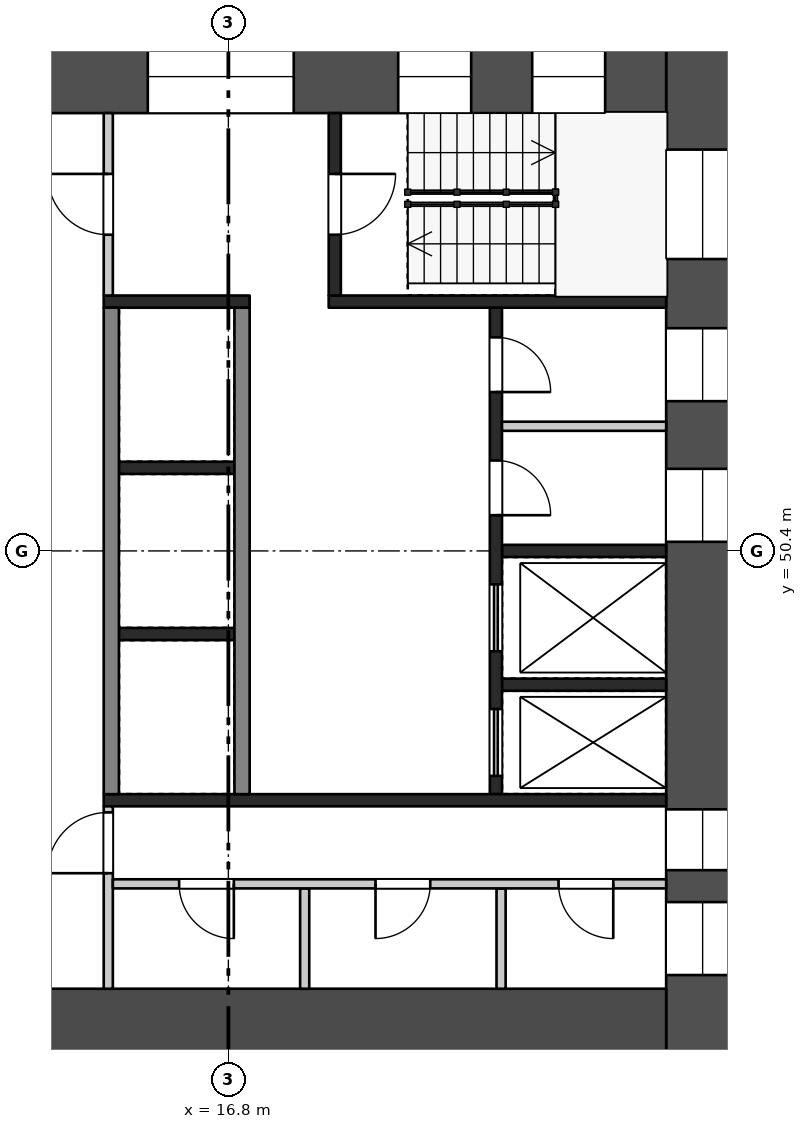
"""IFC4 building model, lengths in metres.
Left out: names, types, materials, properties, quantities, classifications, styles, units other than length and angle.
Written with IfcOpenShell. Run it as: python <this file> out.ifc"""

import sys

from ifc_helpers import new_model, si_unit, direction, frame, frame_2d, origin, place, context, subcontext, project, spatial, rectangle, extrude, element, fill, save


model = new_model("IFC4")
c1 = context("Model", 3, precision=1e-05, world=origin(), true_north=direction((0.0, 1.0)))
c2 = subcontext(c1, "Body", "Model", "MODEL_VIEW")
j1 = project(units=[si_unit("LENGTHUNIT", "METRE"), si_unit("PLANEANGLEUNIT", "RADIAN")], contexts=[c1])
p1 = place(None, origin())
s1 = spatial("IfcSite", under=j1, at=p1, CompositionType="ELEMENT")
p2 = place(p1, origin())
s2 = spatial("IfcBuilding", under=s1, at=p2, CompositionType="ELEMENT")
p3 = place(p2, frame((0.0, 0.0, 119.7)))
s3 = spatial("IfcBuildingStorey", under=s2, at=p3, CompositionType="ELEMENT", Elevation=119.7)
p4 = place(p3, frame((24.6, 58.8, 0.0), z_axis=(0.0, 0.0, 1.0), x_axis=(0.0, -1.0, 0.0)))
e1 = element("IfcWall", 1, at=p4, inside=s3, PredefinedType="SHEAR", context=c2, shape_type="SweptSolid", body=[
    extrude(rectangle(XDim=16.8, YDim=1.2, at=frame_2d((8.4, 0.0))), origin(), (0.0, 0.0, 1.0), 3.22),
])
p5 = place(p4, frame((1.8, 0.0, 0.5)))
e2 = element("IfcOpeningElement", 2, at=p5, cuts=e1, PredefinedType="OPENING", context=c2, shape_type="SweptSolid", body=[
    extrude(rectangle(XDim=1.8, YDim=2.4, at=frame_2d((0.9, 1.2))), frame((0.0, 0.61, 0.0), z_axis=(0.0, -1.0, 0.0), x_axis=(1.0, 0.0, 0.0)), (0.0, 0.0, 1.0), 1.22),
])
p6 = place(p4, frame((4.738, 0.0, 1.6)))
e3 = element("IfcOpeningElement", 3, at=p6, cuts=e1, PredefinedType="OPENING", context=c2, shape_type="SweptSolid", body=[
    extrude(rectangle(XDim=1.2, YDim=1.2, at=frame_2d((0.6, 0.6))), frame((0.0, 0.61, 0.0), z_axis=(0.0, -1.0, 0.0), x_axis=(1.0, 0.0, 0.0)), (0.0, 0.0, 1.0), 1.22),
])
p7 = place(p4, frame((7.05, 0.0, 1.6)))
e4 = element("IfcOpeningElement", 4, at=p7, cuts=e1, PredefinedType="OPENING", context=c2, shape_type="SweptSolid", body=[
    extrude(rectangle(XDim=1.2, YDim=1.2, at=frame_2d((0.6, 0.6))), frame((0.0, 0.61, 0.0), z_axis=(0.0, -1.0, 0.0), x_axis=(1.0, 0.0, 0.0)), (0.0, 0.0, 1.0), 1.22),
])
p8 = place(p4, frame((12.65, 0.0, 0.6)))
e5 = element("IfcOpeningElement", 5, at=p8, cuts=e1, PredefinedType="OPENING", context=c2, shape_type="SweptSolid", body=[
    extrude(rectangle(XDim=1.0, YDim=2.1, at=frame_2d((0.5, 1.05))), frame((0.0, 0.61, 0.0), z_axis=(0.0, -1.0, 0.0), x_axis=(1.0, 0.0, 0.0)), (0.0, 0.0, 1.0), 1.22),
])
p9 = place(p4, frame((14.175, 0.0, 1.6)))
e6 = element("IfcOpeningElement", 6, at=p9, cuts=e1, PredefinedType="OPENING", context=c2, shape_type="SweptSolid", body=[
    extrude(rectangle(XDim=1.2, YDim=1.2, at=frame_2d((0.6, 0.6))), frame((0.0, 0.61, 0.0), z_axis=(0.0, -1.0, 0.0), x_axis=(1.0, 0.0, 0.0)), (0.0, 0.0, 1.0), 1.22),
])
p10 = place(p3, frame((9.6, 58.2, 0.0), z_axis=(0.0, 0.0, 1.0), x_axis=(1.0, 0.0, 0.0)))
e7 = element("IfcWall", 7, at=p10, inside=s3, PredefinedType="SHEAR", context=c2, shape_type="SweptSolid", body=[
    extrude(rectangle(XDim=14.4, YDim=1.2, at=frame_2d((7.2, 0.0))), origin(), (0.0, 0.0, 1.0), 3.22),
])
p11 = place(p10, frame((1.105, 0.0, 0.6)))
e8 = element("IfcOpeningElement", 8, at=p11, cuts=e7, PredefinedType="OPENING", context=c2, shape_type="SweptSolid", body=[
    extrude(rectangle(XDim=3.0, YDim=2.1, at=frame_2d((1.5, 1.05))), frame((0.0, 0.61, 0.0), z_axis=(0.0, -1.0, 0.0), x_axis=(1.0, 0.0, 0.0)), (0.0, 0.0, 1.0), 1.22),
])
p12 = place(p10, frame((5.875, 0.0, 0.6)))
e9 = element("IfcOpeningElement", 9, at=p12, cuts=e7, PredefinedType="OPENING", context=c2, shape_type="SweptSolid", body=[
    extrude(rectangle(XDim=2.4, YDim=2.1, at=frame_2d((1.2, 1.05))), frame((0.0, 0.61, 0.0), z_axis=(0.0, -1.0, 0.0), x_axis=(1.0, 0.0, 0.0)), (0.0, 0.0, 1.0), 1.22),
])
p13 = place(p10, frame((9.993, 0.0, 0.5)))
e10 = element("IfcOpeningElement", 10, at=p13, cuts=e7, PredefinedType="OPENING", context=c2, shape_type="SweptSolid", body=[
    extrude(rectangle(XDim=1.2, YDim=2.4, at=frame_2d((0.6, 1.2))), frame((0.0, 0.61, 0.0), z_axis=(0.0, -1.0, 0.0), x_axis=(1.0, 0.0, 0.0)), (0.0, 0.0, 1.0), 1.22),
])
p14 = place(p10, frame((12.197, 0.0, 0.5)))
e11 = element("IfcOpeningElement", 11, at=p14, cuts=e7, PredefinedType="OPENING", context=c2, shape_type="SweptSolid", body=[
    extrude(rectangle(XDim=1.2, YDim=2.4, at=frame_2d((0.6, 1.2))), frame((0.0, 0.61, 0.0), z_axis=(0.0, -1.0, 0.0), x_axis=(1.0, 0.0, 0.0)), (0.0, 0.0, 1.0), 1.22),
])
p15 = place(p3, frame((9.6, 42.6, 0.0), z_axis=(0.0, 0.0, 1.0), x_axis=(1.0, 0.0, 0.0)))
e12 = element("IfcWall", 12, at=p15, inside=s3, PredefinedType="SHEAR", context=c2, shape_type="SweptSolid", body=[
    extrude(rectangle(XDim=14.4, YDim=1.2, at=frame_2d((7.2, 0.0))), origin(), (0.0, 0.0, 1.0), 3.22),
])
p16 = place(p15, frame((2.1, 0.0, 0.0)))
e13 = element("IfcOpeningElement", 13, at=p16, cuts=e12, PredefinedType="OPENING", context=c2, shape_type="SweptSolid", body=[
    extrude(rectangle(XDim=1.8, YDim=2.1, at=frame_2d((0.9, 1.05))), frame((0.0, 0.61, 0.0), z_axis=(0.0, -1.0, 0.0), x_axis=(1.0, 0.0, 0.0)), (0.0, 0.0, 1.0), 1.22),
])
for number, where, z_axis, x_axis in (
    (14, (15.0, 51.767, 0.0), (0.0, 0.0, 1.0), (1.0, 0.0, 0.0)),
    (15, (15.0, 49.033, 0.0), (0.0, 0.0, 1.0), (1.0, 0.0, 0.0)),
):
    element("IfcWall", number, at=place(p3, frame(where, z_axis=z_axis, x_axis=x_axis)), inside=s3, PredefinedType="SHEAR", context=c2, shape_type="SweptSolid", body=[
        extrude(rectangle(XDim=1.9, YDim=0.2, at=frame_2d((0.95, 0.0))), origin(), (0.0, 0.0, 1.0), 3.22),
    ])
for number, where, z_axis, x_axis in (
    (16, (14.875, 54.4, 0.0), (0.0, 0.0, 1.0), (0.0, -1.0, 0.0)),
    (17, (17.025, 54.4, 0.0), (0.0, 0.0, 1.0), (0.0, -1.0, 0.0)),
):
    element("IfcWall", number, at=place(p3, frame(where, z_axis=z_axis, x_axis=x_axis)), inside=s3, PredefinedType="SHEAR", context=c2, shape_type="SweptSolid", body=[
        extrude(rectangle(XDim=8.0, YDim=0.25, at=frame_2d((4.0, 0.0))), origin(), (0.0, 0.0, 1.0), 3.22),
    ])
for number, where, z_axis, x_axis in (
    (18, (21.3, 50.4, 0.0), (0.0, 0.0, 1.0), (1.0, 0.0, 0.0)),
    (19, (21.3, 48.2, 0.0), (0.0, 0.0, 1.0), (1.0, 0.0, 0.0)),
):
    element("IfcWall", number, at=place(p3, frame(where, z_axis=z_axis, x_axis=x_axis)), inside=s3, PredefinedType="SHEAR", context=c2, shape_type="SweptSolid", body=[
        extrude(rectangle(XDim=2.7, YDim=0.2, at=frame_2d((1.35, 0.0))), origin(), (0.0, 0.0, 1.0), 3.22),
    ])
p17 = place(p3, frame((21.3, 52.45, 0.0), z_axis=(0.0, 0.0, 1.0), x_axis=(1.0, 0.0, 0.0)))
e20 = element("IfcWall", 20, at=p17, inside=s3, PredefinedType="PARTITIONING", context=c2, shape_type="SweptSolid", body=[
    extrude(rectangle(XDim=2.7, YDim=0.15, at=frame_2d((1.35, 0.0))), origin(), (0.0, 0.0, 1.0), 3.22),
])
p18 = place(p3, frame((21.2, 54.4, 0.0), z_axis=(0.0, 0.0, 1.0), x_axis=(0.0, -1.0, 0.0)))
e21 = element("IfcWall", 21, at=p18, inside=s3, PredefinedType="SHEAR", context=c2, shape_type="SweptSolid", body=[
    extrude(rectangle(XDim=8.0, YDim=0.2, at=frame_2d((4.0, 0.0))), origin(), (0.0, 0.0, 1.0), 3.22),
])
p19 = place(p18, frame((0.488, 0.0, 0.0)))
e22 = element("IfcOpeningElement", 22, at=p19, cuts=e21, PredefinedType="OPENING", context=c2, shape_type="SweptSolid", body=[
    extrude(rectangle(XDim=0.9, YDim=2.1, at=frame_2d((0.45, 1.05))), frame((0.0, 0.11, 0.0), z_axis=(0.0, -1.0, 0.0), x_axis=(1.0, 0.0, 0.0)), (0.0, 0.0, 1.0), 0.22),
])
p20 = place(p18, frame((2.512, 0.0, 0.0)))
e23 = element("IfcOpeningElement", 23, at=p20, cuts=e21, PredefinedType="OPENING", context=c2, shape_type="SweptSolid", body=[
    extrude(rectangle(XDim=0.9, YDim=2.1, at=frame_2d((0.45, 1.05))), frame((0.0, 0.11, 0.0), z_axis=(0.0, -1.0, 0.0), x_axis=(1.0, 0.0, 0.0)), (0.0, 0.0, 1.0), 0.22),
])
p21 = place(p18, frame((4.55, 0.0, 0.0)))
e24 = element("IfcOpeningElement", 24, at=p21, cuts=e21, PredefinedType="OPENING", context=c2, shape_type="SweptSolid", body=[
    extrude(rectangle(XDim=1.1, YDim=2.1, at=frame_2d((0.55, 1.05))), frame((0.0, 0.11, 0.0), z_axis=(0.0, -1.0, 0.0), x_axis=(1.0, 0.0, 0.0)), (0.0, 0.0, 1.0), 0.22),
])
p22 = place(p18, frame((6.6, 0.0, 0.0)))
e25 = element("IfcOpeningElement", 25, at=p22, cuts=e21, PredefinedType="OPENING", context=c2, shape_type="SweptSolid", body=[
    extrude(rectangle(XDim=1.1, YDim=2.1, at=frame_2d((0.55, 1.05))), frame((0.0, 0.11, 0.0), z_axis=(0.0, -1.0, 0.0), x_axis=(1.0, 0.0, 0.0)), (0.0, 0.0, 1.0), 0.22),
])
p23 = place(p3, frame((14.75, 54.5, 0.0), z_axis=(0.0, 0.0, 1.0), x_axis=(1.0, 0.0, 0.0)))
e26 = element("IfcWall", 26, at=p23, inside=s3, PredefinedType="SHEAR", context=c2, shape_type="SweptSolid", body=[
    extrude(rectangle(XDim=2.4, YDim=0.2, at=frame_2d((1.2, 0.0))), origin(), (0.0, 0.0, 1.0), 3.22),
])
p24 = place(p3, frame((18.45, 54.5, 0.0), z_axis=(0.0, 0.0, 1.0), x_axis=(1.0, 0.0, 0.0)))
e27 = element("IfcWall", 27, at=p24, inside=s3, PredefinedType="SHEAR", context=c2, shape_type="SweptSolid", body=[
    extrude(rectangle(XDim=5.55, YDim=0.2, at=frame_2d((2.775, 0.0))), origin(), (0.0, 0.0, 1.0), 3.22),
])
p25 = place(p3, frame((14.825, 57.6, 0.0), z_axis=(0.0, 0.0, 1.0), x_axis=(0.0, -1.0, 0.0)))
e28 = element("IfcWall", 28, at=p25, inside=s3, PredefinedType="PARTITIONING", context=c2, shape_type="SweptSolid", body=[
    extrude(rectangle(XDim=3.0, YDim=0.15, at=frame_2d((1.5, 0.0))), origin(), (0.0, 0.0, 1.0), 3.22),
])
p26 = place(p25, frame((1.0, 0.0, 0.0)))
e29 = element("IfcOpeningElement", 29, at=p26, cuts=e28, PredefinedType="OPENING", context=c2, shape_type="SweptSolid", body=[
    extrude(rectangle(XDim=1.0, YDim=2.1, at=frame_2d((0.5, 1.05))), frame((0.0, 0.085, 0.0), z_axis=(0.0, -1.0, 0.0), x_axis=(1.0, 0.0, 0.0)), (0.0, 0.0, 1.0), 0.17),
])
p27 = place(p3, frame((18.55, 57.6, 0.0), z_axis=(0.0, 0.0, 1.0), x_axis=(0.0, -1.0, 0.0)))
e30 = element("IfcWall", 30, at=p27, inside=s3, PredefinedType="SHEAR", context=c2, shape_type="SweptSolid", body=[
    extrude(rectangle(XDim=3.0, YDim=0.2, at=frame_2d((1.5, 0.0))), origin(), (0.0, 0.0, 1.0), 3.22),
])
p28 = place(p27, frame((1.0, 0.0, 0.0)))
e31 = element("IfcOpeningElement", 31, at=p28, cuts=e30, PredefinedType="OPENING", context=c2, shape_type="SweptSolid", body=[
    extrude(rectangle(XDim=1.0, YDim=2.1, at=frame_2d((0.5, 1.05))), frame((0.0, 0.11, 0.0), z_axis=(0.0, -1.0, 0.0), x_axis=(1.0, 0.0, 0.0)), (0.0, 0.0, 1.0), 0.22),
])
p29 = place(p3, frame((14.75, 46.3, 0.0), z_axis=(0.0, 0.0, 1.0), x_axis=(1.0, 0.0, 0.0)))
e32 = element("IfcWall", 32, at=p29, inside=s3, PredefinedType="SHEAR", context=c2, shape_type="SweptSolid", body=[
    extrude(rectangle(XDim=9.25, YDim=0.2, at=frame_2d((4.625, 0.0))), origin(), (0.0, 0.0, 1.0), 3.22),
])
p30 = place(p3, frame((14.825, 46.2, 0.0), z_axis=(0.0, 0.0, 1.0), x_axis=(0.0, -1.0, 0.0)))
e33 = element("IfcWall", 33, at=p30, inside=s3, PredefinedType="PARTITIONING", context=c2, shape_type="SweptSolid", body=[
    extrude(rectangle(XDim=3.0, YDim=0.15, at=frame_2d((1.5, 0.0))), origin(), (0.0, 0.0, 1.0), 3.22),
])
p31 = place(p30, frame((0.1, 0.0, 0.0)))
e34 = element("IfcOpeningElement", 34, at=p31, cuts=e33, PredefinedType="OPENING", context=c2, shape_type="SweptSolid", body=[
    extrude(rectangle(XDim=1.0, YDim=2.1, at=frame_2d((0.5, 1.05))), frame((0.0, 0.085, 0.0), z_axis=(0.0, -1.0, 0.0), x_axis=(1.0, 0.0, 0.0)), (0.0, 0.0, 1.0), 0.17),
])
for number, where, z_axis, x_axis in (
    (35, (18.055, 44.85, 0.0), (0.0, 0.0, 1.0), (0.0, -1.0, 0.0)),
    (36, (21.285, 44.85, 0.0), (0.0, 0.0, 1.0), (0.0, -1.0, 0.0)),
):
    element("IfcWall", number, at=place(p3, frame(where, z_axis=z_axis, x_axis=x_axis)), inside=s3, PredefinedType="PARTITIONING", context=c2, shape_type="SweptSolid", body=[
        extrude(rectangle(XDim=1.65, YDim=0.15, at=frame_2d((0.825, 0.0))), origin(), (0.0, 0.0, 1.0), 3.22),
    ])
p32 = place(p3, frame((14.9, 44.925, 0.0), z_axis=(0.0, 0.0, 1.0), x_axis=(1.0, 0.0, 0.0)))
e37 = element("IfcWall", 37, at=p32, inside=s3, PredefinedType="PARTITIONING", context=c2, shape_type="SweptSolid", body=[
    extrude(rectangle(XDim=9.1, YDim=0.15, at=frame_2d((4.55, 0.0))), origin(), (0.0, 0.0, 1.0), 3.22),
])
p33 = place(p32, frame((1.09, 0.0, 0.0)))
e38 = element("IfcOpeningElement", 38, at=p33, cuts=e37, PredefinedType="OPENING", context=c2, shape_type="SweptSolid", body=[
    extrude(rectangle(XDim=0.9, YDim=2.1, at=frame_2d((0.45, 1.05))), frame((0.0, 0.085, 0.0), z_axis=(0.0, -1.0, 0.0), x_axis=(1.0, 0.0, 0.0)), (0.0, 0.0, 1.0), 0.17),
])
p34 = place(p32, frame((4.32, 0.0, 0.0)))
e39 = element("IfcOpeningElement", 39, at=p34, cuts=e37, PredefinedType="OPENING", context=c2, shape_type="SweptSolid", body=[
    extrude(rectangle(XDim=0.9, YDim=2.1, at=frame_2d((0.45, 1.05))), frame((0.0, 0.085, 0.0), z_axis=(0.0, -1.0, 0.0), x_axis=(1.0, 0.0, 0.0)), (0.0, 0.0, 1.0), 0.17),
])
p35 = place(p32, frame((7.33, 0.0, 0.0)))
e40 = element("IfcOpeningElement", 40, at=p35, cuts=e37, PredefinedType="OPENING", context=c2, shape_type="SweptSolid", body=[
    extrude(rectangle(XDim=0.9, YDim=2.1, at=frame_2d((0.45, 1.05))), frame((0.0, 0.085, 0.0), z_axis=(0.0, -1.0, 0.0), x_axis=(1.0, 0.0, 0.0)), (0.0, 0.0, 1.0), 0.17),
])
p36 = place(p19, origin())
e41 = element("IfcDoor", 41, at=p36, inside=s3, OperationType="SINGLE_SWING_RIGHT", PredefinedType="DOOR", context=c2, shape_type="SweptSolid", body=[
    extrude(rectangle(XDim=0.9, YDim=2.1, at=frame_2d((0.45, 1.05))), frame((0.0, 0.025, 0.0), z_axis=(0.0, -1.0, 0.0), x_axis=(1.0, 0.0, 0.0)), (0.0, 0.0, 1.0), 0.05),
])
fill(e22, e41)
p37 = place(p20, origin())
e42 = element("IfcDoor", 42, at=p37, inside=s3, OperationType="SINGLE_SWING_RIGHT", PredefinedType="DOOR", context=c2, shape_type="SweptSolid", body=[
    extrude(rectangle(XDim=0.9, YDim=2.1, at=frame_2d((0.45, 1.05))), frame((0.0, 0.025, 0.0), z_axis=(0.0, -1.0, 0.0), x_axis=(1.0, 0.0, 0.0)), (0.0, 0.0, 1.0), 0.05),
])
fill(e23, e42)
p38 = place(p21, origin())
e43 = element("IfcDoor", 43, at=p38, inside=s3, OperationType="DOUBLE_DOOR_SLIDING", PredefinedType="DOOR", context=c2, shape_type="SweptSolid", body=[
    extrude(rectangle(XDim=1.1, YDim=2.1, at=frame_2d((0.55, 1.05))), frame((0.0, 0.025, 0.0), z_axis=(0.0, -1.0, 0.0), x_axis=(1.0, 0.0, 0.0)), (0.0, 0.0, 1.0), 0.05),
])
fill(e24, e43)
p39 = place(p22, origin())
e44 = element("IfcDoor", 44, at=p39, inside=s3, OperationType="DOUBLE_DOOR_SLIDING", PredefinedType="DOOR", context=c2, shape_type="SweptSolid", body=[
    extrude(rectangle(XDim=1.1, YDim=2.1, at=frame_2d((0.55, 1.05))), frame((0.0, 0.025, 0.0), z_axis=(0.0, -1.0, 0.0), x_axis=(1.0, 0.0, 0.0)), (0.0, 0.0, 1.0), 0.05),
])
fill(e25, e44)
p40 = place(p26, frame((1.0, 0.0, 0.0), z_axis=(0.0, 0.0, 1.0), x_axis=(-1.0, 0.0, 0.0)))
e45 = element("IfcDoor", 45, at=p40, inside=s3, OperationType="SINGLE_SWING_RIGHT", PredefinedType="DOOR", context=c2, shape_type="SweptSolid", body=[
    extrude(rectangle(XDim=1.0, YDim=2.1, at=frame_2d((0.5, 1.05))), frame((0.0, 0.025, 0.0), z_axis=(0.0, -1.0, 0.0), x_axis=(1.0, 0.0, 0.0)), (0.0, 0.0, 1.0), 0.05),
])
fill(e29, e45)
p41 = place(p28, origin())
e46 = element("IfcDoor", 46, at=p41, inside=s3, OperationType="SINGLE_SWING_LEFT", PredefinedType="DOOR", context=c2, shape_type="SweptSolid", body=[
    extrude(rectangle(XDim=1.0, YDim=2.1, at=frame_2d((0.5, 1.05))), frame((0.0, 0.025, 0.0), z_axis=(0.0, -1.0, 0.0), x_axis=(1.0, 0.0, 0.0)), (0.0, 0.0, 1.0), 0.05),
])
fill(e31, e46)
p42 = place(p31, frame((1.0, 0.0, 0.0), z_axis=(0.0, 0.0, 1.0), x_axis=(-1.0, 0.0, 0.0)))
e47 = element("IfcDoor", 47, at=p42, inside=s3, OperationType="SINGLE_SWING_LEFT", PredefinedType="DOOR", context=c2, shape_type="SweptSolid", body=[
    extrude(rectangle(XDim=1.0, YDim=2.1, at=frame_2d((0.5, 1.05))), frame((0.0, 0.025, 0.0), z_axis=(0.0, -1.0, 0.0), x_axis=(1.0, 0.0, 0.0)), (0.0, 0.0, 1.0), 0.05),
])
fill(e34, e47)
p43 = place(p33, frame((0.9, 0.0, 0.0), z_axis=(0.0, 0.0, 1.0), x_axis=(-1.0, 0.0, 0.0)))
e48 = element("IfcDoor", 48, at=p43, inside=s3, OperationType="SINGLE_SWING_LEFT", PredefinedType="DOOR", context=c2, shape_type="SweptSolid", body=[
    extrude(rectangle(XDim=0.9, YDim=2.1, at=frame_2d((0.45, 1.05))), frame((0.0, 0.025, 0.0), z_axis=(0.0, -1.0, 0.0), x_axis=(1.0, 0.0, 0.0)), (0.0, 0.0, 1.0), 0.05),
])
fill(e38, e48)
p44 = place(p34, frame((0.9, 0.0, 0.0), z_axis=(0.0, 0.0, 1.0), x_axis=(-1.0, 0.0, 0.0)))
e49 = element("IfcDoor", 49, at=p44, inside=s3, OperationType="SINGLE_SWING_RIGHT", PredefinedType="DOOR", context=c2, shape_type="SweptSolid", body=[
    extrude(rectangle(XDim=0.9, YDim=2.1, at=frame_2d((0.45, 1.05))), frame((0.0, 0.025, 0.0), z_axis=(0.0, -1.0, 0.0), x_axis=(1.0, 0.0, 0.0)), (0.0, 0.0, 1.0), 0.05),
])
fill(e39, e49)
p45 = place(p35, frame((0.9, 0.0, 0.0), z_axis=(0.0, 0.0, 1.0), x_axis=(-1.0, 0.0, 0.0)))
e50 = element("IfcDoor", 50, at=p45, inside=s3, OperationType="SINGLE_SWING_LEFT", PredefinedType="DOOR", context=c2, shape_type="SweptSolid", body=[
    extrude(rectangle(XDim=0.9, YDim=2.1, at=frame_2d((0.45, 1.05))), frame((0.0, 0.025, 0.0), z_axis=(0.0, -1.0, 0.0), x_axis=(1.0, 0.0, 0.0)), (0.0, 0.0, 1.0), 0.05),
])
fill(e40, e50)
p46 = place(p5, origin())
e51 = element("IfcWindow", 51, at=p46, inside=s3, PartitioningType="SINGLE_PANEL", PredefinedType="WINDOW", context=c2, shape_type="SweptSolid", body=[
    extrude(rectangle(XDim=1.8, YDim=2.4, at=frame_2d((0.9, 1.2))), frame((0.0, 0.03, 0.0), z_axis=(0.0, -1.0, 0.0), x_axis=(1.0, 0.0, 0.0)), (0.0, 0.0, 1.0), 0.06),
])
fill(e2, e51)
p47 = place(p6, origin())
e52 = element("IfcWindow", 52, at=p47, inside=s3, PartitioningType="SINGLE_PANEL", PredefinedType="WINDOW", context=c2, shape_type="SweptSolid", body=[
    extrude(rectangle(XDim=1.2, YDim=1.2, at=frame_2d((0.6, 0.6))), frame((0.0, 0.03, 0.0), z_axis=(0.0, -1.0, 0.0), x_axis=(1.0, 0.0, 0.0)), (0.0, 0.0, 1.0), 0.06),
])
fill(e3, e52)
p48 = place(p7, origin())
e53 = element("IfcWindow", 53, at=p48, inside=s3, PartitioningType="SINGLE_PANEL", PredefinedType="WINDOW", context=c2, shape_type="SweptSolid", body=[
    extrude(rectangle(XDim=1.2, YDim=1.2, at=frame_2d((0.6, 0.6))), frame((0.0, 0.03, 0.0), z_axis=(0.0, -1.0, 0.0), x_axis=(1.0, 0.0, 0.0)), (0.0, 0.0, 1.0), 0.06),
])
fill(e4, e53)
p49 = place(p8, origin())
e54 = element("IfcWindow", 54, at=p49, inside=s3, PartitioningType="SINGLE_PANEL", PredefinedType="WINDOW", context=c2, shape_type="SweptSolid", body=[
    extrude(rectangle(XDim=1.0, YDim=2.1, at=frame_2d((0.5, 1.05))), frame((0.0, 0.03, 0.0), z_axis=(0.0, -1.0, 0.0), x_axis=(1.0, 0.0, 0.0)), (0.0, 0.0, 1.0), 0.06),
])
fill(e5, e54)
p50 = place(p9, origin())
e55 = element("IfcWindow", 55, at=p50, inside=s3, PartitioningType="SINGLE_PANEL", PredefinedType="WINDOW", context=c2, shape_type="SweptSolid", body=[
    extrude(rectangle(XDim=1.2, YDim=1.2, at=frame_2d((0.6, 0.6))), frame((0.0, 0.03, 0.0), z_axis=(0.0, -1.0, 0.0), x_axis=(1.0, 0.0, 0.0)), (0.0, 0.0, 1.0), 0.06),
])
fill(e6, e55)
p51 = place(p12, origin())
e56 = element("IfcWindow", 56, at=p51, inside=s3, PartitioningType="SINGLE_PANEL", PredefinedType="WINDOW", context=c2, shape_type="SweptSolid", body=[
    extrude(rectangle(XDim=2.4, YDim=2.1, at=frame_2d((1.2, 1.05))), frame((0.0, 0.03, 0.0), z_axis=(0.0, -1.0, 0.0), x_axis=(1.0, 0.0, 0.0)), (0.0, 0.0, 1.0), 0.06),
])
fill(e9, e56)
p52 = place(p13, origin())
e57 = element("IfcWindow", 57, at=p52, inside=s3, PartitioningType="SINGLE_PANEL", PredefinedType="WINDOW", context=c2, shape_type="SweptSolid", body=[
    extrude(rectangle(XDim=1.2, YDim=2.4, at=frame_2d((0.6, 1.2))), frame((0.0, 0.03, 0.0), z_axis=(0.0, -1.0, 0.0), x_axis=(1.0, 0.0, 0.0)), (0.0, 0.0, 1.0), 0.06),
])
fill(e10, e57)
p53 = place(p14, origin())
e58 = element("IfcWindow", 58, at=p53, inside=s3, PartitioningType="SINGLE_PANEL", PredefinedType="WINDOW", context=c2, shape_type="SweptSolid", body=[
    extrude(rectangle(XDim=1.2, YDim=2.4, at=frame_2d((0.6, 1.2))), frame((0.0, 0.03, 0.0), z_axis=(0.0, -1.0, 0.0), x_axis=(1.0, 0.0, 0.0)), (0.0, 0.0, 1.0), 0.06),
])
fill(e11, e58)
save(model, sys.argv[1])
